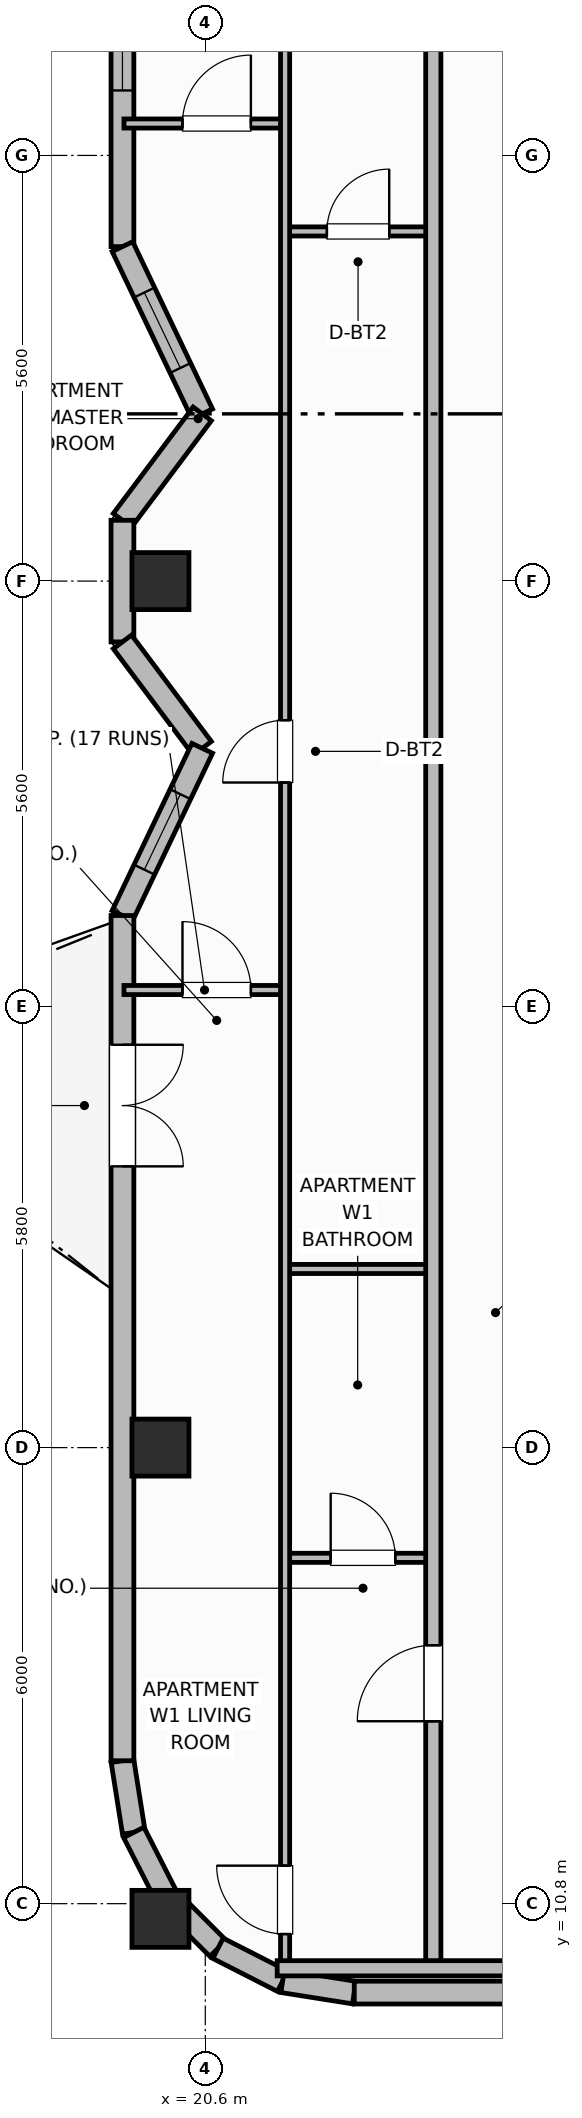
"""IFC4 building model, lengths in metres.
Left out: names, types, materials, properties, quantities, classifications, styles, units other than length and angle.
Written with IfcOpenShell. Run it as: python <this file> out.ifc"""

import sys

from ifc_helpers import new_model, si_unit, direction, frame, frame_2d, origin, origin_2d, place, context, subcontext, project, spatial, rectangle, extrude, element, fill, save


model = new_model("IFC4")
c1 = context("Model", 3, precision=1e-05, world=origin(), true_north=direction((0.0, 1.0)))
c2 = subcontext(c1, "Body", "Model", "MODEL_VIEW")
j1 = project(units=[si_unit("LENGTHUNIT", "METRE"), si_unit("PLANEANGLEUNIT", "RADIAN")], contexts=[c1])
p1 = place(None, origin())
s1 = spatial("IfcSite", under=j1, at=p1, CompositionType="ELEMENT")
p2 = place(p1, origin())
s2 = spatial("IfcBuilding", under=s1, at=p2, CompositionType="ELEMENT")
p3 = place(p2, frame((0.0, 0.0, 278.7)))
s3 = spatial("IfcBuildingStorey", under=s2, at=p3, CompositionType="ELEMENT", Elevation=278.7)
for number, where, z_axis, x_axis in (
    (1, (20.01, 10.6, 0.0), (0.0, 0.0, 1.0), (1.0, 0.0, 0.0)),
    (2, (20.01, 16.8, 0.0), (0.0, 0.0, 1.0), (1.0, 0.0, 0.0)),
    (3, (20.01, 28.2, 0.0), (0.0, 0.0, 1.0), (1.0, 0.0, 0.0)),
):
    element("IfcColumn", number, at=place(p3, frame(where, z_axis=z_axis, x_axis=x_axis)), inside=s3, PredefinedType="COLUMN", context=c2, shape_type="SweptSolid", body=[
        extrude(rectangle(XDim=0.75, YDim=0.75, at=origin_2d()), origin(), (0.0, 0.0, 1.0), 3.7),
    ])
p4 = place(p3, frame((19.51, 12.68, 0.0), z_axis=(0.0, 0.0, 1.0), x_axis=(0.156343617883, -0.987702725088, 0.0)))
e4 = element("IfcWall", 4, at=p4, inside=s3, PredefinedType="SOLIDWALL", context=c2, shape_type="SweptSolid", body=[
    extrude(rectangle(XDim=0.954, YDim=0.3, at=frame_2d((0.477, 0.0))), origin(), (0.0, 0.0, 1.0), 2.73),
])
for number, where, z_axis, x_axis in (
    (5, (19.659, 11.738, 0.0), (0.0, 0.0, 1.0), (0.454, -0.891, 0.0)),
    (6, (20.093, 10.887, 0.0), (0.0, 0.0, 1.0), (0.707, -0.707, 0.0)),
):
    element("IfcWall", number, at=place(p3, frame(where, z_axis=z_axis, x_axis=x_axis)), inside=s3, PredefinedType="SOLIDWALL", context=c2, shape_type="SweptSolid", body=[
        extrude(rectangle(XDim=0.954, YDim=0.3, at=frame_2d((0.477, 0.0))), origin(), (0.0, 0.0, 1.0), 2.73),
    ])
p5 = place(p3, frame((20.767, 10.212, 0.0), z_axis=(0.0, 0.0, 1.0), x_axis=(0.891023873617, -0.45395644796, 0.0)))
e7 = element("IfcWall", 7, at=p5, inside=s3, PredefinedType="SOLIDWALL", context=c2, shape_type="SweptSolid", body=[
    extrude(rectangle(XDim=0.954, YDim=0.3, at=frame_2d((0.477, 0.0))), origin(), (0.0, 0.0, 1.0), 2.73),
])
p6 = place(p3, frame((21.617, 9.779, 0.0), z_axis=(0.0, 0.0, 1.0), x_axis=(0.987669453596, -0.156553666304, 0.0)))
e8 = element("IfcWall", 8, at=p6, inside=s3, PredefinedType="SOLIDWALL", context=c2, shape_type="SweptSolid", body=[
    extrude(rectangle(XDim=0.954, YDim=0.3, at=frame_2d((0.477, 0.0))), origin(), (0.0, 0.0, 1.0), 2.73),
])
p7 = place(p3, frame((22.56, 9.63, 0.0), z_axis=(0.0, 0.0, 1.0), x_axis=(1.0, 0.0, 0.0)))
e9 = element("IfcWall", 9, at=p7, inside=s3, PredefinedType="SOLIDWALL", context=c2, shape_type="SweptSolid", body=[
    extrude(rectangle(XDim=33.28, YDim=0.3, at=frame_2d((16.64, 0.0))), origin(), (0.0, 0.0, 1.0), 2.73),
])
p8 = place(p7, frame((5.08, 0.0, 0.76)))
e10 = element("IfcOpeningElement", 10, at=p8, cuts=e9, PredefinedType="OPENING", context=c2, shape_type="SweptSolid", body=[
    extrude(rectangle(XDim=1.8, YDim=1.85, at=frame_2d((0.9, 0.925))), frame((0.0, 0.16, 0.0), z_axis=(0.0, -1.0, 0.0), x_axis=(1.0, 0.0, 0.0)), (0.0, 0.0, 1.0), 0.32),
])
p9 = place(p7, frame((8.633, 0.0, 0.76)))
e11 = element("IfcOpeningElement", 11, at=p9, cuts=e9, PredefinedType="OPENING", context=c2, shape_type="SweptSolid", body=[
    extrude(rectangle(XDim=1.8, YDim=1.85, at=frame_2d((0.9, 0.925))), frame((0.0, 0.16, 0.0), z_axis=(0.0, -1.0, 0.0), x_axis=(1.0, 0.0, 0.0)), (0.0, 0.0, 1.0), 0.32),
])
p10 = place(p7, frame((15.74, 0.0, 0.76)))
e12 = element("IfcOpeningElement", 12, at=p10, cuts=e9, PredefinedType="OPENING", context=c2, shape_type="SweptSolid", body=[
    extrude(rectangle(XDim=1.8, YDim=1.85, at=frame_2d((0.9, 0.925))), frame((0.0, 0.16, 0.0), z_axis=(0.0, -1.0, 0.0), x_axis=(1.0, 0.0, 0.0)), (0.0, 0.0, 1.0), 0.32),
])
p11 = place(p7, frame((22.847, 0.0, 0.76)))
e13 = element("IfcOpeningElement", 13, at=p11, cuts=e9, PredefinedType="OPENING", context=c2, shape_type="SweptSolid", body=[
    extrude(rectangle(XDim=1.8, YDim=1.85, at=frame_2d((0.9, 0.925))), frame((0.0, 0.16, 0.0), z_axis=(0.0, -1.0, 0.0), x_axis=(1.0, 0.0, 0.0)), (0.0, 0.0, 1.0), 0.32),
])
p12 = place(p7, frame((26.4, 0.0, 0.76)))
e14 = element("IfcOpeningElement", 14, at=p12, cuts=e9, PredefinedType="OPENING", context=c2, shape_type="SweptSolid", body=[
    extrude(rectangle(XDim=1.8, YDim=1.85, at=frame_2d((0.9, 0.925))), frame((0.0, 0.16, 0.0), z_axis=(0.0, -1.0, 0.0), x_axis=(1.0, 0.0, 0.0)), (0.0, 0.0, 1.0), 0.32),
])
p13 = place(p3, frame((19.51, 43.72, 0.0), z_axis=(0.0, 0.0, 1.0), x_axis=(0.0, -1.0, 0.0)))
e15 = element("IfcWall", 15, at=p13, inside=s3, PredefinedType="SOLIDWALL", context=c2, shape_type="SweptSolid", body=[
    extrude(rectangle(XDim=11.12, YDim=0.3, at=frame_2d((5.56, 0.0))), origin(), (0.0, 0.0, 1.0), 2.73),
])
p14 = place(p13, frame((6.965, 0.0, 0.71)))
e16 = element("IfcOpeningElement", 16, at=p14, cuts=e15, PredefinedType="OPENING", context=c2, shape_type="SweptSolid", body=[
    extrude(rectangle(XDim=2.1, YDim=1.9, at=frame_2d((1.05, 0.95))), frame((0.0, 0.16, 0.0), z_axis=(0.0, -1.0, 0.0), x_axis=(1.0, 0.0, 0.0)), (0.0, 0.0, 1.0), 0.32),
])
p15 = place(p3, frame((19.51, 32.6, 0.0), z_axis=(0.0, 0.0, 1.0), x_axis=(0.430714756408, -0.902488115496, 0.0)))
e17 = element("IfcWall", 17, at=p15, inside=s3, PredefinedType="SOLIDWALL", context=c2, shape_type="SweptSolid", body=[
    extrude(rectangle(XDim=2.438, YDim=0.3, at=frame_2d((1.219, 0.0))), origin(), (0.0, 0.0, 1.0), 2.73),
])
p16 = place(p15, frame((0.669, 0.0, 0.92)))
e18 = element("IfcOpeningElement", 18, at=p16, cuts=e17, PredefinedType="OPENING", context=c2, shape_type="SweptSolid", body=[
    extrude(rectangle(XDim=1.1, YDim=1.65, at=frame_2d((0.55, 0.825))), frame((0.0, 0.16, 0.0), z_axis=(0.0, -1.0, 0.0), x_axis=(1.0, 0.0, 0.0)), (0.0, 0.0, 1.0), 0.32),
])
p17 = place(p3, frame((20.56, 30.4, 0.0), z_axis=(0.0, 0.0, 1.0), x_axis=(-0.600044643168, -0.799966515677, 0.0)))
e19 = element("IfcWall", 19, at=p17, inside=s3, PredefinedType="SOLIDWALL", context=c2, shape_type="SweptSolid", body=[
    extrude(rectangle(XDim=1.75, YDim=0.3, at=frame_2d((0.875, 0.0))), origin(), (0.0, 0.0, 1.0), 2.73),
])
p18 = place(p3, frame((19.51, 29.0, 0.0), z_axis=(0.0, 0.0, 1.0), x_axis=(0.0, -1.0, 0.0)))
e20 = element("IfcWall", 20, at=p18, inside=s3, PredefinedType="SOLIDWALL", context=c2, shape_type="SweptSolid", body=[
    extrude(rectangle(XDim=1.6, YDim=0.3, at=frame_2d((0.8, 0.0))), origin(), (0.0, 0.0, 1.0), 2.73),
])
p19 = place(p3, frame((19.51, 27.4, 0.0), z_axis=(0.0, 0.0, 1.0), x_axis=(0.600044643168, -0.799966515677, 0.0)))
e21 = element("IfcWall", 21, at=p19, inside=s3, PredefinedType="SOLIDWALL", context=c2, shape_type="SweptSolid", body=[
    extrude(rectangle(XDim=1.75, YDim=0.3, at=frame_2d((0.875, 0.0))), origin(), (0.0, 0.0, 1.0), 2.73),
])
p20 = place(p3, frame((20.56, 26.0, 0.0), z_axis=(0.0, 0.0, 1.0), x_axis=(-0.430753686581, -0.902469534941, 0.0)))
e22 = element("IfcWall", 22, at=p20, inside=s3, PredefinedType="SOLIDWALL", context=c2, shape_type="SweptSolid", body=[
    extrude(rectangle(XDim=2.438, YDim=0.3, at=frame_2d((1.219, 0.0))), origin(), (0.0, 0.0, 1.0), 2.73),
])
p21 = place(p20, frame((0.669, 0.0, 0.92)))
e23 = element("IfcOpeningElement", 23, at=p21, cuts=e22, PredefinedType="OPENING", context=c2, shape_type="SweptSolid", body=[
    extrude(rectangle(XDim=1.1, YDim=1.65, at=frame_2d((0.55, 0.825))), frame((0.0, 0.16, 0.0), z_axis=(0.0, -1.0, 0.0), x_axis=(1.0, 0.0, 0.0)), (0.0, 0.0, 1.0), 0.32),
])
p22 = place(p3, frame((19.51, 23.8, 0.0), z_axis=(0.0, 0.0, 1.0), x_axis=(0.0, -1.0, 0.0)))
e24 = element("IfcWall", 24, at=p22, inside=s3, PredefinedType="SOLIDWALL", context=c2, shape_type="SweptSolid", body=[
    extrude(rectangle(XDim=11.12, YDim=0.3, at=frame_2d((5.56, 0.0))), origin(), (0.0, 0.0, 1.0), 2.73),
])
p23 = place(p22, frame((1.7, 0.0, 0.0)))
e25 = element("IfcOpeningElement", 25, at=p23, cuts=e24, PredefinedType="OPENING", context=c2, shape_type="SweptSolid", body=[
    extrude(rectangle(XDim=1.6, YDim=2.1, at=frame_2d((0.8, 1.05))), frame((0.0, 0.16, 0.0), z_axis=(0.0, -1.0, 0.0), x_axis=(1.0, 0.0, 0.0)), (0.0, 0.0, 1.0), 0.32),
])
p24 = place(p3, frame((21.65, 15.35, 0.0), z_axis=(0.0, 0.0, 1.0), x_axis=(1.0, 0.0, 0.0)))
e26 = element("IfcWall", 26, at=p24, inside=s3, PredefinedType="PARTITIONING", context=c2, shape_type="SweptSolid", body=[
    extrude(rectangle(XDim=1.95, YDim=0.12, at=frame_2d((0.975, 0.0))), origin(), (0.0, 0.0, 1.0), 2.56),
])
p25 = place(p24, frame((0.6, 0.0, 0.0)))
e27 = element("IfcOpeningElement", 27, at=p25, cuts=e26, PredefinedType="OPENING", context=c2, shape_type="SweptSolid", body=[
    extrude(rectangle(XDim=0.85, YDim=2.1, at=frame_2d((0.425, 1.05))), frame((0.0, 0.07, 0.0), z_axis=(0.0, -1.0, 0.0), x_axis=(1.0, 0.0, 0.0)), (0.0, 0.0, 1.0), 0.14),
])
p26 = place(p3, frame((21.65, 19.15, 0.0), z_axis=(0.0, 0.0, 1.0), x_axis=(1.0, 0.0, 0.0)))
e28 = element("IfcWall", 28, at=p26, inside=s3, PredefinedType="PARTITIONING", context=c2, shape_type="SweptSolid", body=[
    extrude(rectangle(XDim=1.95, YDim=0.12, at=frame_2d((0.975, 0.0))), origin(), (0.0, 0.0, 1.0), 2.56),
])
p27 = place(p3, frame((21.65, 32.8, 0.0), z_axis=(0.0, 0.0, 1.0), x_axis=(1.0, 0.0, 0.0)))
e29 = element("IfcWall", 29, at=p27, inside=s3, PredefinedType="PARTITIONING", context=c2, shape_type="SweptSolid", body=[
    extrude(rectangle(XDim=1.95, YDim=0.12, at=frame_2d((0.975, 0.0))), origin(), (0.0, 0.0, 1.0), 2.56),
])
p28 = place(p27, frame((0.55, 0.0, 0.0)))
e30 = element("IfcOpeningElement", 30, at=p28, cuts=e29, PredefinedType="OPENING", context=c2, shape_type="SweptSolid", body=[
    extrude(rectangle(XDim=0.82, YDim=2.08, at=frame_2d((0.41, 1.04))), frame((0.0, 0.07, 0.0), z_axis=(0.0, -1.0, 0.0), x_axis=(1.0, 0.0, 0.0)), (0.0, 0.0, 1.0), 0.14),
])
p29 = place(p3, frame((19.53, 22.82, 0.0), z_axis=(0.0, 0.0, 1.0), x_axis=(1.0, 0.0, 0.0)))
e31 = element("IfcWall", 31, at=p29, inside=s3, PredefinedType="PARTITIONING", context=c2, shape_type="SweptSolid", body=[
    extrude(rectangle(XDim=2.12, YDim=0.12, at=frame_2d((1.06, 0.0))), origin(), (0.0, 0.0, 1.0), 2.56),
])
p30 = place(p29, frame((0.77, 0.0, 0.0)))
e32 = element("IfcOpeningElement", 32, at=p30, cuts=e31, PredefinedType="OPENING", context=c2, shape_type="SweptSolid", body=[
    extrude(rectangle(XDim=0.9, YDim=2.1, at=frame_2d((0.45, 1.05))), frame((0.0, 0.07, 0.0), z_axis=(0.0, -1.0, 0.0), x_axis=(1.0, 0.0, 0.0)), (0.0, 0.0, 1.0), 0.14),
])
p31 = place(p3, frame((19.53, 34.22, 0.0), z_axis=(0.0, 0.0, 1.0), x_axis=(1.0, 0.0, 0.0)))
e33 = element("IfcWall", 33, at=p31, inside=s3, PredefinedType="PARTITIONING", context=c2, shape_type="SweptSolid", body=[
    extrude(rectangle(XDim=2.12, YDim=0.12, at=frame_2d((1.06, 0.0))), origin(), (0.0, 0.0, 1.0), 2.56),
])
p32 = place(p31, frame((0.77, 0.0, 0.0)))
e34 = element("IfcOpeningElement", 34, at=p32, cuts=e33, PredefinedType="OPENING", context=c2, shape_type="SweptSolid", body=[
    extrude(rectangle(XDim=0.9, YDim=2.1, at=frame_2d((0.45, 1.05))), frame((0.0, 0.07, 0.0), z_axis=(0.0, -1.0, 0.0), x_axis=(1.0, 0.0, 0.0)), (0.0, 0.0, 1.0), 0.14),
])
p33 = place(p3, frame((21.65, 9.99, 0.0), z_axis=(0.0, 0.0, 1.0), x_axis=(0.0, 1.0, 0.0)))
e35 = element("IfcWall", 35, at=p33, inside=s3, PredefinedType="PARTITIONING", context=c2, shape_type="SweptSolid", body=[
    extrude(rectangle(XDim=36.42, YDim=0.12, at=frame_2d((18.21, 0.0))), origin(), (0.0, 0.0, 1.0), 2.56),
])
p34 = place(p33, frame((0.41, 0.0, 0.0)))
e36 = element("IfcOpeningElement", 36, at=p34, cuts=e35, PredefinedType="OPENING", context=c2, shape_type="SweptSolid", body=[
    extrude(rectangle(XDim=0.9, YDim=2.1, at=frame_2d((0.45, 1.05))), frame((0.0, 0.07, 0.0), z_axis=(0.0, -1.0, 0.0), x_axis=(1.0, 0.0, 0.0)), (0.0, 0.0, 1.0), 0.14),
])
p35 = place(p33, frame((15.56, 0.0, 0.0)))
e37 = element("IfcOpeningElement", 37, at=p35, cuts=e35, PredefinedType="OPENING", context=c2, shape_type="SweptSolid", body=[
    extrude(rectangle(XDim=0.82, YDim=2.08, at=frame_2d((0.41, 1.04))), frame((0.0, 0.07, 0.0), z_axis=(0.0, -1.0, 0.0), x_axis=(1.0, 0.0, 0.0)), (0.0, 0.0, 1.0), 0.14),
])
p36 = place(p3, frame((23.6, 9.95, 0.0), z_axis=(0.0, 0.0, 1.0), x_axis=(0.0, 1.0, 0.0)))
e38 = element("IfcWall", 38, at=p36, inside=s3, PredefinedType="PARTITIONING", context=c2, shape_type="SweptSolid", body=[
    extrude(rectangle(XDim=36.5, YDim=0.2, at=frame_2d((18.25, 0.0))), origin(), (0.0, 0.0, 1.0), 2.56),
])
p37 = place(p36, frame((3.25, 0.0, 0.0)))
e39 = element("IfcOpeningElement", 39, at=p37, cuts=e38, PredefinedType="OPENING", context=c2, shape_type="SweptSolid", body=[
    extrude(rectangle(XDim=1.0, YDim=2.15, at=frame_2d((0.5, 1.075))), frame((0.0, 0.11, 0.0), z_axis=(0.0, -1.0, 0.0), x_axis=(1.0, 0.0, 0.0)), (0.0, 0.0, 1.0), 0.22),
])
p38 = place(p3, frame((21.546, 9.95, 0.0), z_axis=(0.0, 0.0, 1.0), x_axis=(1.0, 0.0, 0.0)))
e40 = element("IfcWall", 40, at=p38, inside=s3, PredefinedType="PARTITIONING", context=c2, shape_type="SweptSolid", body=[
    extrude(rectangle(XDim=3.754, YDim=0.2, at=frame_2d((1.877, 0.0))), origin(), (0.0, 0.0, 1.0), 2.56),
])
p39 = place(p14, origin())
e41 = element("IfcWindow", 41, at=p39, inside=s3, PartitioningType="SINGLE_PANEL", PredefinedType="WINDOW", context=c2, shape_type="SweptSolid", body=[
    extrude(rectangle(XDim=2.1, YDim=1.9, at=frame_2d((1.05, 0.95))), frame((0.0, 0.03, 0.0), z_axis=(0.0, -1.0, 0.0), x_axis=(1.0, 0.0, 0.0)), (0.0, 0.0, 1.0), 0.06),
])
fill(e16, e41)
p40 = place(p16, origin())
e42 = element("IfcWindow", 42, at=p40, inside=s3, PartitioningType="SINGLE_PANEL", PredefinedType="WINDOW", context=c2, shape_type="SweptSolid", body=[
    extrude(rectangle(XDim=1.1, YDim=1.65, at=frame_2d((0.55, 0.825))), frame((0.0, 0.03, 0.0), z_axis=(0.0, -1.0, 0.0), x_axis=(1.0, 0.0, 0.0)), (0.0, 0.0, 1.0), 0.06),
])
fill(e18, e42)
p41 = place(p21, origin())
e43 = element("IfcWindow", 43, at=p41, inside=s3, PartitioningType="SINGLE_PANEL", PredefinedType="WINDOW", context=c2, shape_type="SweptSolid", body=[
    extrude(rectangle(XDim=1.1, YDim=1.65, at=frame_2d((0.55, 0.825))), frame((0.0, 0.03, 0.0), z_axis=(0.0, -1.0, 0.0), x_axis=(1.0, 0.0, 0.0)), (0.0, 0.0, 1.0), 0.06),
])
fill(e23, e43)
p42 = place(p23, origin())
e44 = element("IfcDoor", 44, at=p42, inside=s3, OperationType="DOUBLE_DOOR_SINGLE_SWING", PredefinedType="DOOR", context=c2, shape_type="SweptSolid", body=[
    extrude(rectangle(XDim=1.6, YDim=2.1, at=frame_2d((0.8, 1.05))), frame((0.0, 0.025, 0.0), z_axis=(0.0, -1.0, 0.0), x_axis=(1.0, 0.0, 0.0)), (0.0, 0.0, 1.0), 0.05),
])
fill(e25, e44)
p43 = place(p25, origin())
e45 = element("IfcDoor", 45, at=p43, inside=s3, OperationType="SINGLE_SWING_LEFT", PredefinedType="DOOR", context=c2, shape_type="SweptSolid", body=[
    extrude(rectangle(XDim=0.85, YDim=2.1, at=frame_2d((0.425, 1.05))), frame((0.0, 0.025, 0.0), z_axis=(0.0, -1.0, 0.0), x_axis=(1.0, 0.0, 0.0)), (0.0, 0.0, 1.0), 0.05),
])
fill(e27, e45)
p44 = place(p28, origin())
e46 = element("IfcDoor", 46, at=p44, inside=s3, OperationType="SINGLE_SWING_RIGHT", PredefinedType="DOOR", context=c2, shape_type="SweptSolid", body=[
    extrude(rectangle(XDim=0.82, YDim=2.08, at=frame_2d((0.41, 1.04))), frame((0.0, 0.025, 0.0), z_axis=(0.0, -1.0, 0.0), x_axis=(1.0, 0.0, 0.0)), (0.0, 0.0, 1.0), 0.05),
])
fill(e30, e46)
p45 = place(p30, origin())
e47 = element("IfcDoor", 47, at=p45, inside=s3, OperationType="SINGLE_SWING_LEFT", PredefinedType="DOOR", context=c2, shape_type="SweptSolid", body=[
    extrude(rectangle(XDim=0.9, YDim=2.1, at=frame_2d((0.45, 1.05))), frame((0.0, 0.025, 0.0), z_axis=(0.0, -1.0, 0.0), x_axis=(1.0, 0.0, 0.0)), (0.0, 0.0, 1.0), 0.05),
])
fill(e32, e47)
p46 = place(p32, origin())
e48 = element("IfcDoor", 48, at=p46, inside=s3, OperationType="SINGLE_SWING_RIGHT", PredefinedType="DOOR", context=c2, shape_type="SweptSolid", body=[
    extrude(rectangle(XDim=0.9, YDim=2.1, at=frame_2d((0.45, 1.05))), frame((0.0, 0.025, 0.0), z_axis=(0.0, -1.0, 0.0), x_axis=(1.0, 0.0, 0.0)), (0.0, 0.0, 1.0), 0.05),
])
fill(e34, e48)
p47 = place(p34, origin())
e49 = element("IfcDoor", 49, at=p47, inside=s3, OperationType="SINGLE_SWING_RIGHT", PredefinedType="DOOR", context=c2, shape_type="SweptSolid", body=[
    extrude(rectangle(XDim=0.9, YDim=2.1, at=frame_2d((0.45, 1.05))), frame((0.0, 0.025, 0.0), z_axis=(0.0, -1.0, 0.0), x_axis=(1.0, 0.0, 0.0)), (0.0, 0.0, 1.0), 0.05),
])
fill(e36, e49)
p48 = place(p35, origin())
e50 = element("IfcDoor", 50, at=p48, inside=s3, OperationType="SINGLE_SWING_LEFT", PredefinedType="DOOR", context=c2, shape_type="SweptSolid", body=[
    extrude(rectangle(XDim=0.82, YDim=2.08, at=frame_2d((0.41, 1.04))), frame((0.0, 0.025, 0.0), z_axis=(0.0, -1.0, 0.0), x_axis=(1.0, 0.0, 0.0)), (0.0, 0.0, 1.0), 0.05),
])
fill(e37, e50)
p49 = place(p37, origin())
e51 = element("IfcDoor", 51, at=p49, inside=s3, OperationType="SINGLE_SWING_LEFT", PredefinedType="DOOR", context=c2, shape_type="SweptSolid", body=[
    extrude(rectangle(XDim=1.0, YDim=2.15, at=frame_2d((0.5, 1.075))), frame((0.0, 0.025, 0.0), z_axis=(0.0, -1.0, 0.0), x_axis=(1.0, 0.0, 0.0)), (0.0, 0.0, 1.0), 0.05),
])
fill(e39, e51)
save(model, sys.argv[1])
